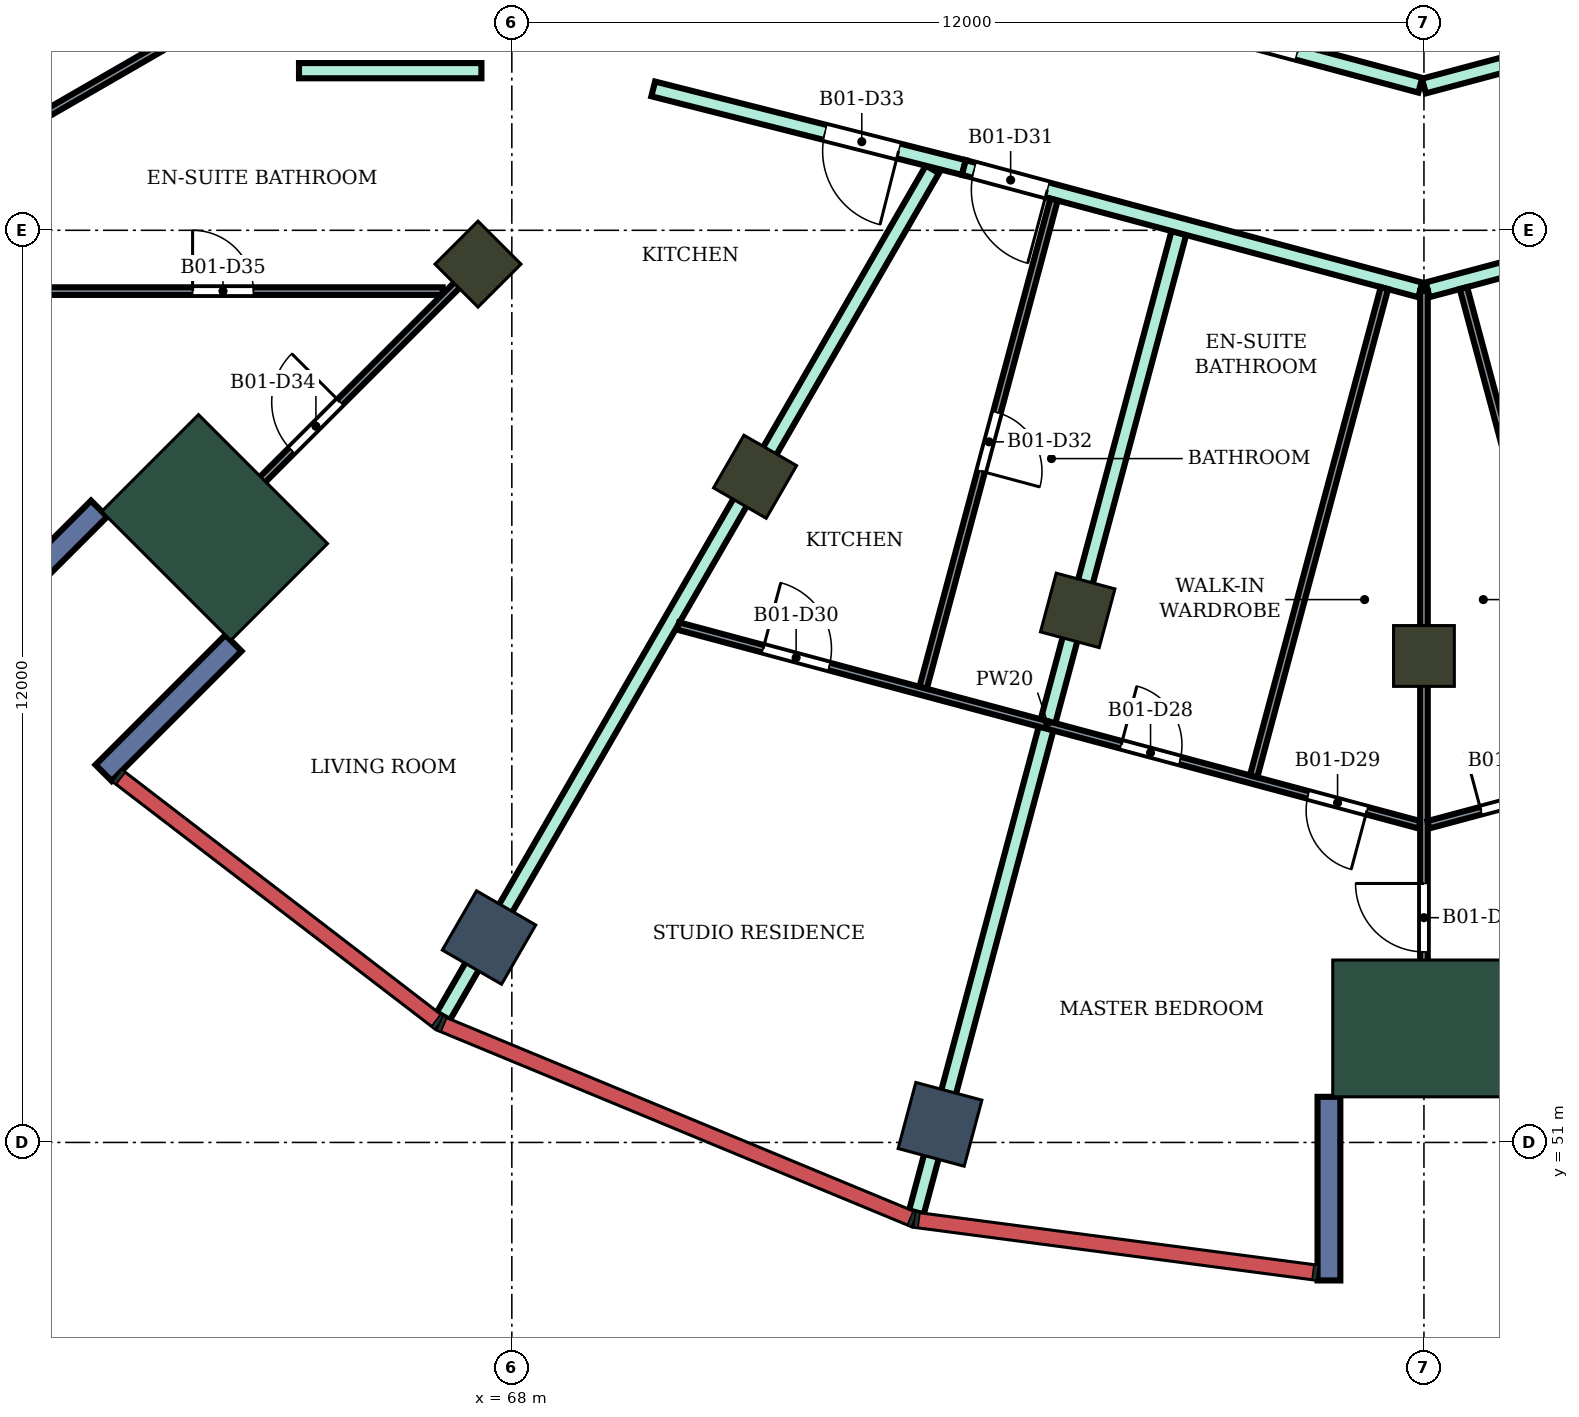
"""IFC4 building model, lengths in metres.
Left out: names, types, materials, properties, quantities, classifications, styles, units other than length and angle.
Written with IfcOpenShell. Run it as: python <this file> out.ifc"""

import sys

from ifc_helpers import new_model, si_unit, direction, frame, frame_2d, origin, origin_2d, place, context, subcontext, project, spatial, rectangle, extrude, element, fill, save


model = new_model("IFC4")
c1 = context("Model", 3, precision=1e-05, world=origin(), true_north=direction((0.0, 1.0)))
c2 = subcontext(c1, "Body", "Model", "MODEL_VIEW")
j1 = project(units=[si_unit("LENGTHUNIT", "METRE"), si_unit("PLANEANGLEUNIT", "RADIAN")], contexts=[c1])
p1 = place(None, origin())
s1 = spatial("IfcSite", under=j1, at=p1, CompositionType="ELEMENT")
p2 = place(p1, origin())
s2 = spatial("IfcBuilding", under=s1, at=p2, CompositionType="ELEMENT")
p3 = place(p2, frame((0.0, 0.0, 212.5)))
s3 = spatial("IfcBuildingStorey", under=s2, at=p3, CompositionType="ELEMENT", Elevation=212.5)
for number, where, z_axis, x_axis in (
    (1, (67.7, 53.696, 0.0), (0.0, 0.0, 1.0), (-0.5, -0.866, 0.0)),
    (2, (73.633, 51.238, 0.0), (0.0, 0.0, 1.0), (-0.259, -0.966, 0.0)),
):
    element("IfcColumn", number, at=place(p3, frame(where, z_axis=z_axis, x_axis=x_axis)), inside=s3, PredefinedType="COLUMN", context=c2, shape_type="SweptSolid", body=[
        extrude(rectangle(XDim=0.9, YDim=0.9, at=origin_2d()), origin(), (0.0, 0.0, 1.0), 4.2),
    ])
for number, where, z_axis, x_axis in (
    (3, (67.555, 62.555, 0.0), (0.0, 0.0, 1.0), (-0.707, -0.707, 0.0)),
    (4, (71.2, 59.758, 0.0), (0.0, 0.0, 1.0), (-0.5, -0.866, 0.0)),
    (5, (75.445, 58.0, 0.0), (0.0, 0.0, 1.0), (-0.259, -0.966, 0.0)),
    (6, (80.0, 57.4, 0.0), (0.0, 0.0, 1.0), (0.0, -1.0, 0.0)),
):
    element("IfcColumn", number, at=place(p3, frame(where, z_axis=z_axis, x_axis=x_axis)), inside=s3, PredefinedType="COLUMN", context=c2, shape_type="SweptSolid", body=[
        extrude(rectangle(XDim=0.8, YDim=0.8, at=origin_2d()), origin(), (0.0, 0.0, 1.0), 4.2),
    ])
for number, where, z_axis, x_axis in (
    (7, (64.09, 59.09, 0.0), (0.0, 0.0, 1.0), (-0.707, -0.707, 0.0)),
    (8, (80.0, 52.5, 0.0), (0.0, 0.0, 1.0), (0.0, -1.0, 0.0)),
):
    element("IfcColumn", number, at=place(p3, frame(where, z_axis=z_axis, x_axis=x_axis)), inside=s3, PredefinedType="COLUMN", context=c2, shape_type="SweptSolid", body=[
        extrude(rectangle(XDim=1.8, YDim=2.4, at=origin_2d()), origin(), (0.0, 0.0, 1.0), 4.2),
    ])
for number, where, z_axis, x_axis in (
    (9, (62.57, 59.338, 0.0), (0.0, 0.0, 1.0), (-0.707, -0.707, 0.0)),
    (10, (64.338, 57.57, 0.0), (0.0, 0.0, 1.0), (-0.707, -0.707, 0.0)),
    (11, (78.75, 51.6, 0.0), (0.0, 0.0, 1.0), (0.0, -1.0, 0.0)),
):
    element("IfcWall", number, at=place(p3, frame(where, z_axis=z_axis, x_axis=x_axis)), inside=s3, PredefinedType="NOTDEFINED", context=c2, shape_type="SweptSolid", body=[
        extrude(rectangle(XDim=2.416, YDim=0.3, at=frame_2d((1.208, 0.0))), origin(), (0.0, 0.0, 1.0), 4.2),
    ])
p4 = place(p3, frame((65.2, 65.1, 0.0), z_axis=(0.0, 0.0, 1.0), x_axis=(1.0, 0.0, 0.0)))
e12 = element("IfcWall", 12, at=p4, inside=s3, PredefinedType="PARTITIONING", context=c2, shape_type="SweptSolid", body=[
    extrude(rectangle(XDim=2.4, YDim=0.2, at=frame_2d((1.2, 0.0))), origin(), (0.0, 0.0, 1.0), 3.75),
])
p5 = place(p3, frame((67.099, 52.66, 0.0), z_axis=(0.0, 0.0, 1.0), x_axis=(0.500120472712, 0.865955837658, 0.0)))
e13 = element("IfcWall", 13, at=p5, inside=s3, PredefinedType="PARTITIONING", context=c2, shape_type="SweptSolid", body=[
    extrude(rectangle(XDim=12.866, YDim=0.2, at=frame_2d((6.433, 0.0))), origin(), (0.0, 0.0, 1.0), 3.75),
])
p6 = place(p3, frame((69.86, 64.86, 0.0), z_axis=(0.0, 0.0, 1.0), x_axis=(0.96942980222, -0.245368821506, 0.0)))
e14 = element("IfcWall", 14, at=p6, inside=s3, PredefinedType="PARTITIONING", context=c2, shape_type="SweptSolid", body=[
    extrude(rectangle(XDim=4.216, YDim=0.2, at=frame_2d((2.108, 0.0))), origin(), (0.0, 0.0, 1.0), 3.75),
])
p7 = place(p6, frame((2.331, 0.0, 0.0)))
e15 = element("IfcOpeningElement", 15, at=p7, cuts=e14, PredefinedType="OPENING", context=c2, shape_type="SweptSolid", body=[
    extrude(rectangle(XDim=1.0, YDim=2.1, at=frame_2d((0.5, 1.05))), frame((0.0, 0.11, 0.0), z_axis=(0.0, -1.0, 0.0), x_axis=(1.0, 0.0, 0.0)), (0.0, 0.0, 1.0), 0.22),
])
p8 = place(p3, frame((73.323, 50.081, 0.0), z_axis=(0.0, 0.0, 1.0), x_axis=(0.258837030899, 0.96592100683, 0.0)))
e16 = element("IfcWall", 16, at=p8, inside=s3, PredefinedType="PARTITIONING", context=c2, shape_type="SweptSolid", body=[
    extrude(rectangle(XDim=13.338, YDim=0.2, at=frame_2d((6.669, 0.0))), origin(), (0.0, 0.0, 1.0), 3.75),
])
p9 = place(p3, frame((73.947, 63.826, 0.0), z_axis=(0.0, 0.0, 1.0), x_axis=(0.965876152316, -0.259004359784, 0.0)))
e17 = element("IfcWall", 17, at=p9, inside=s3, PredefinedType="PARTITIONING", context=c2, shape_type="SweptSolid", body=[
    extrude(rectangle(XDim=6.217, YDim=0.2, at=frame_2d((3.108, 0.0))), origin(), (0.0, 0.0, 1.0), 3.75),
])
p10 = place(p9, frame((0.137, 0.0, 0.0)))
e18 = element("IfcOpeningElement", 18, at=p10, cuts=e17, PredefinedType="OPENING", context=c2, shape_type="SweptSolid", body=[
    extrude(rectangle(XDim=1.0, YDim=2.1, at=frame_2d((0.5, 1.05))), frame((0.0, 0.11, 0.0), z_axis=(0.0, -1.0, 0.0), x_axis=(1.0, 0.0, 0.0)), (0.0, 0.0, 1.0), 0.22),
])
p11 = place(p3, frame((74.603, 66.342, 0.0), z_axis=(0.0, 0.0, 1.0), x_axis=(0.965895298152, -0.258932950796, 0.0)))
e19 = element("IfcWall", 19, at=p11, inside=s3, PredefinedType="PARTITIONING", context=c2, shape_type="SweptSolid", body=[
    extrude(rectangle(XDim=5.538, YDim=0.2, at=frame_2d((2.769, 0.0))), origin(), (0.0, 0.0, 1.0), 3.75),
])
p12 = place(p11, frame((2.062, 0.0, 0.0)))
e20 = element("IfcOpeningElement", 20, at=p12, cuts=e19, PredefinedType="OPENING", context=c2, shape_type="SweptSolid", body=[
    extrude(rectangle(XDim=1.8, YDim=2.1, at=frame_2d((0.9, 1.05))), frame((0.0, 0.11, 0.0), z_axis=(0.0, -1.0, 0.0), x_axis=(1.0, 0.0, 0.0)), (0.0, 0.0, 1.0), 0.22),
])
p13 = place(p3, frame((80.0, 64.898, 0.0), z_axis=(0.0, 0.0, 1.0), x_axis=(0.966237419782, 0.257653349704, 0.0)))
e21 = element("IfcWall", 21, at=p13, inside=s3, PredefinedType="PARTITIONING", context=c2, shape_type="SweptSolid", body=[
    extrude(rectangle(XDim=8.169, YDim=0.2, at=frame_2d((4.084, 0.0))), origin(), (0.0, 0.0, 1.0), 3.75),
])
p14 = place(p13, frame((6.428, 0.0, 0.0)))
e22 = element("IfcOpeningElement", 22, at=p14, cuts=e21, PredefinedType="OPENING", context=c2, shape_type="SweptSolid", body=[
    extrude(rectangle(XDim=0.9, YDim=2.1, at=frame_2d((0.45, 1.05))), frame((0.0, 0.11, 0.0), z_axis=(0.0, -1.0, 0.0), x_axis=(1.0, 0.0, 0.0)), (0.0, 0.0, 1.0), 0.22),
])
p15 = place(p3, frame((80.048, 62.217, 0.0), z_axis=(0.0, 0.0, 1.0), x_axis=(0.966097920642, 0.258175923996, 0.0)))
e23 = element("IfcWall", 23, at=p15, inside=s3, PredefinedType="PARTITIONING", context=c2, shape_type="SweptSolid", body=[
    extrude(rectangle(XDim=6.217, YDim=0.2, at=frame_2d((3.108, 0.0))), origin(), (0.0, 0.0, 1.0), 3.75),
])
p16 = place(p15, frame((3.792, 0.0, 0.0)))
e24 = element("IfcOpeningElement", 24, at=p16, cuts=e23, PredefinedType="OPENING", context=c2, shape_type="SweptSolid", body=[
    extrude(rectangle(XDim=1.0, YDim=2.1, at=frame_2d((0.5, 1.05))), frame((0.0, 0.11, 0.0), z_axis=(0.0, -1.0, 0.0), x_axis=(1.0, 0.0, 0.0)), (0.0, 0.0, 1.0), 0.22),
])
p17 = place(p3, frame((57.658, 62.102, 0.0), z_axis=(0.0, 0.0, 1.0), x_axis=(0.866131372301, 0.499816412211, 0.0)))
e25 = element("IfcWall", 25, at=p17, inside=s3, PredefinedType="PARTITIONING", context=c2, shape_type="SweptSolid", body=[
    extrude(rectangle(XDim=6.598, YDim=0.1, at=frame_2d((3.299, 0.0))), origin(), (0.0, 0.0, 1.0), 3.75),
])
p18 = place(p17, frame((1.77, 0.0, 0.0)))
e26 = element("IfcOpeningElement", 26, at=p18, cuts=e25, PredefinedType="OPENING", context=c2, shape_type="SweptSolid", body=[
    extrude(rectangle(XDim=0.9, YDim=2.1, at=frame_2d((0.45, 1.05))), frame((0.0, 0.06, 0.0), z_axis=(0.0, -1.0, 0.0), x_axis=(1.0, 0.0, 0.0)), (0.0, 0.0, 1.0), 0.12),
])
p19 = place(p3, frame((61.2, 62.2, 0.0), z_axis=(0.0, 0.0, 1.0), x_axis=(1.0, 0.0, 0.0)))
e27 = element("IfcWall", 27, at=p19, inside=s3, PredefinedType="PARTITIONING", context=c2, shape_type="SweptSolid", body=[
    extrude(rectangle(XDim=5.89, YDim=0.1, at=frame_2d((2.945, 0.0))), origin(), (0.0, 0.0, 1.0), 3.75),
])
p20 = place(p19, frame((2.6, 0.0, 0.0)))
e28 = element("IfcOpeningElement", 28, at=p20, cuts=e27, PredefinedType="OPENING", context=c2, shape_type="SweptSolid", body=[
    extrude(rectangle(XDim=0.8, YDim=2.1, at=frame_2d((0.4, 1.05))), frame((0.0, 0.06, 0.0), z_axis=(0.0, -1.0, 0.0), x_axis=(1.0, 0.0, 0.0)), (0.0, 0.0, 1.0), 0.12),
])
p21 = place(p3, frame((63.596, 58.596, 0.0), z_axis=(0.0, 0.0, 1.0), x_axis=(0.707106781187, 0.707106781187, 0.0)))
e29 = element("IfcWall", 29, at=p21, inside=s3, PredefinedType="PARTITIONING", context=c2, shape_type="SweptSolid", body=[
    extrude(rectangle(XDim=5.663, YDim=0.1, at=frame_2d((2.832, 0.0))), origin(), (0.0, 0.0, 1.0), 3.75),
])
p22 = place(p21, frame((2.134, 0.0, 0.0)))
e30 = element("IfcOpeningElement", 30, at=p22, cuts=e29, PredefinedType="OPENING", context=c2, shape_type="SweptSolid", body=[
    extrude(rectangle(XDim=0.9, YDim=2.1, at=frame_2d((0.45, 1.05))), frame((0.0, 0.06, 0.0), z_axis=(0.0, -1.0, 0.0), x_axis=(1.0, 0.0, 0.0)), (0.0, 0.0, 1.0), 0.12),
])
p23 = place(p3, frame((70.188, 57.794, 0.0), z_axis=(0.0, 0.0, 1.0), x_axis=(0.965894620005, -0.25893548047, 0.0)))
e31 = element("IfcWall", 31, at=p23, inside=s3, PredefinedType="PARTITIONING", context=c2, shape_type="SweptSolid", body=[
    extrude(rectangle(XDim=10.098, YDim=0.1, at=frame_2d((5.049, 0.0))), origin(), (0.0, 0.0, 1.0), 3.75),
])
p24 = place(p23, frame((6.034, 0.0, 0.0)))
e32 = element("IfcOpeningElement", 32, at=p24, cuts=e31, PredefinedType="OPENING", context=c2, shape_type="SweptSolid", body=[
    extrude(rectangle(XDim=0.8, YDim=2.1, at=frame_2d((0.4, 1.05))), frame((0.0, 0.06, 0.0), z_axis=(0.0, -1.0, 0.0), x_axis=(1.0, 0.0, 0.0)), (0.0, 0.0, 1.0), 0.12),
])
p25 = place(p23, frame((8.581, 0.0, 0.0)))
e33 = element("IfcOpeningElement", 33, at=p25, cuts=e31, PredefinedType="OPENING", context=c2, shape_type="SweptSolid", body=[
    extrude(rectangle(XDim=0.8, YDim=2.1, at=frame_2d((0.4, 1.05))), frame((0.0, 0.06, 0.0), z_axis=(0.0, -1.0, 0.0), x_axis=(1.0, 0.0, 0.0)), (0.0, 0.0, 1.0), 0.12),
])
p26 = place(p23, frame((1.156, 0.0, 0.0)))
e34 = element("IfcOpeningElement", 34, at=p26, cuts=e31, PredefinedType="OPENING", context=c2, shape_type="SweptSolid", body=[
    extrude(rectangle(XDim=0.9, YDim=2.1, at=frame_2d((0.45, 1.05))), frame((0.0, 0.06, 0.0), z_axis=(0.0, -1.0, 0.0), x_axis=(1.0, 0.0, 0.0)), (0.0, 0.0, 1.0), 0.12),
])
p27 = place(p3, frame((73.411, 56.982, 0.0), z_axis=(0.0, 0.0, 1.0), x_axis=(0.258992397652, 0.96587935994, 0.0)))
e35 = element("IfcWall", 35, at=p27, inside=s3, PredefinedType="PARTITIONING", context=c2, shape_type="SweptSolid", body=[
    extrude(rectangle(XDim=6.649, YDim=0.1, at=frame_2d((3.325, 0.0))), origin(), (0.0, 0.0, 1.0), 3.75),
])
p28 = place(p27, frame((2.95, 0.0, 0.0)))
e36 = element("IfcOpeningElement", 36, at=p28, cuts=e35, PredefinedType="OPENING", context=c2, shape_type="SweptSolid", body=[
    extrude(rectangle(XDim=0.8, YDim=2.1, at=frame_2d((0.4, 1.05))), frame((0.0, 0.06, 0.0), z_axis=(0.0, -1.0, 0.0), x_axis=(1.0, 0.0, 0.0)), (0.0, 0.0, 1.0), 0.12),
])
p29 = place(p3, frame((77.759, 55.816, 0.0), z_axis=(0.0, 0.0, 1.0), x_axis=(0.258802763352, 0.965930188824, 0.0)))
e37 = element("IfcWall", 37, at=p29, inside=s3, PredefinedType="PARTITIONING", context=c2, shape_type="SweptSolid", body=[
    extrude(rectangle(XDim=6.65, YDim=0.1, at=frame_2d((3.325, 0.0))), origin(), (0.0, 0.0, 1.0), 3.75),
])
p30 = place(p3, frame((80.0, 51.8, 0.0), z_axis=(0.0, 0.0, 1.0), x_axis=(0.0, 1.0, 0.0)))
e38 = element("IfcWall", 38, at=p30, inside=s3, PredefinedType="PARTITIONING", context=c2, shape_type="SweptSolid", body=[
    extrude(rectangle(XDim=10.404, YDim=0.1, at=frame_2d((5.202, 0.0))), origin(), (0.0, 0.0, 1.0), 3.75),
])
p31 = place(p30, frame((1.707, 0.0, 0.0)))
e39 = element("IfcOpeningElement", 39, at=p31, cuts=e38, PredefinedType="OPENING", context=c2, shape_type="SweptSolid", body=[
    extrude(rectangle(XDim=0.9, YDim=2.1, at=frame_2d((0.45, 1.05))), frame((0.0, 0.06, 0.0), z_axis=(0.0, -1.0, 0.0), x_axis=(1.0, 0.0, 0.0)), (0.0, 0.0, 1.0), 0.12),
])
p32 = place(p3, frame((80.058, 55.179, 0.0), z_axis=(0.0, 0.0, 1.0), x_axis=(0.965917403523, 0.258850477246, 0.0)))
e40 = element("IfcWall", 40, at=p32, inside=s3, PredefinedType="PARTITIONING", context=c2, shape_type="SweptSolid", body=[
    extrude(rectangle(XDim=5.014, YDim=0.1, at=frame_2d((2.507, 0.0))), origin(), (0.0, 0.0, 1.0), 3.75),
])
p33 = place(p32, frame((0.717, 0.0, 0.0)))
e41 = element("IfcOpeningElement", 41, at=p33, cuts=e40, PredefinedType="OPENING", context=c2, shape_type="SweptSolid", body=[
    extrude(rectangle(XDim=0.8, YDim=2.1, at=frame_2d((0.4, 1.05))), frame((0.0, 0.06, 0.0), z_axis=(0.0, -1.0, 0.0), x_axis=(1.0, 0.0, 0.0)), (0.0, 0.0, 1.0), 0.12),
])
p34 = place(p3, frame((80.52, 62.24, 0.0), z_axis=(0.0, 0.0, 1.0), x_axis=(0.258802763352, -0.965930188824, 0.0)))
e42 = element("IfcWall", 42, at=p34, inside=s3, PredefinedType="PARTITIONING", context=c2, shape_type="SweptSolid", body=[
    extrude(rectangle(XDim=6.65, YDim=0.1, at=frame_2d((3.325, 0.0))), origin(), (0.0, 0.0, 1.0), 3.75),
])
p35 = place(p33, origin())
e43 = element("IfcDoor", 43, at=p35, inside=s3, OperationType="SINGLE_SWING_LEFT", PredefinedType="DOOR", context=c2, shape_type="SweptSolid", body=[
    extrude(rectangle(XDim=0.8, YDim=2.1, at=frame_2d((0.4, 1.05))), frame((0.0, 0.025, 0.0), z_axis=(0.0, -1.0, 0.0), x_axis=(1.0, 0.0, 0.0)), (0.0, 0.0, 1.0), 0.05),
])
fill(e41, e43)
p36 = place(p31, origin())
e44 = element("IfcDoor", 44, at=p36, inside=s3, OperationType="SINGLE_SWING_RIGHT", PredefinedType="DOOR", context=c2, shape_type="SweptSolid", body=[
    extrude(rectangle(XDim=0.9, YDim=2.1, at=frame_2d((0.45, 1.05))), frame((0.0, 0.025, 0.0), z_axis=(0.0, -1.0, 0.0), x_axis=(1.0, 0.0, 0.0)), (0.0, 0.0, 1.0), 0.05),
])
fill(e39, e44)
p37 = place(p24, origin())
e45 = element("IfcDoor", 45, at=p37, inside=s3, OperationType="SINGLE_SWING_LEFT", PredefinedType="DOOR", context=c2, shape_type="SweptSolid", body=[
    extrude(rectangle(XDim=0.8, YDim=2.1, at=frame_2d((0.4, 1.05))), frame((0.0, 0.025, 0.0), z_axis=(0.0, -1.0, 0.0), x_axis=(1.0, 0.0, 0.0)), (0.0, 0.0, 1.0), 0.05),
])
fill(e32, e45)
p38 = place(p25, frame((0.8, 0.0, 0.0), z_axis=(0.0, 0.0, 1.0), x_axis=(-1.0, 0.0, 0.0)))
e46 = element("IfcDoor", 46, at=p38, inside=s3, OperationType="SINGLE_SWING_LEFT", PredefinedType="DOOR", context=c2, shape_type="SweptSolid", body=[
    extrude(rectangle(XDim=0.8, YDim=2.1, at=frame_2d((0.4, 1.05))), frame((0.0, 0.025, 0.0), z_axis=(0.0, -1.0, 0.0), x_axis=(1.0, 0.0, 0.0)), (0.0, 0.0, 1.0), 0.05),
])
fill(e33, e46)
p39 = place(p26, origin())
e47 = element("IfcDoor", 47, at=p39, inside=s3, OperationType="SINGLE_SWING_LEFT", PredefinedType="DOOR", context=c2, shape_type="SweptSolid", body=[
    extrude(rectangle(XDim=0.9, YDim=2.1, at=frame_2d((0.45, 1.05))), frame((0.0, 0.025, 0.0), z_axis=(0.0, -1.0, 0.0), x_axis=(1.0, 0.0, 0.0)), (0.0, 0.0, 1.0), 0.05),
])
fill(e34, e47)
p40 = place(p10, frame((1.0, 0.0, 0.0), z_axis=(0.0, 0.0, 1.0), x_axis=(-1.0, 0.0, 0.0)))
e48 = element("IfcDoor", 48, at=p40, inside=s3, OperationType="SINGLE_SWING_LEFT", PredefinedType="DOOR", context=c2, shape_type="SweptSolid", body=[
    extrude(rectangle(XDim=1.0, YDim=2.1, at=frame_2d((0.5, 1.05))), frame((0.0, 0.025, 0.0), z_axis=(0.0, -1.0, 0.0), x_axis=(1.0, 0.0, 0.0)), (0.0, 0.0, 1.0), 0.05),
])
fill(e18, e48)
p41 = place(p28, frame((0.8, 0.0, 0.0), z_axis=(0.0, 0.0, 1.0), x_axis=(-1.0, 0.0, 0.0)))
e49 = element("IfcDoor", 49, at=p41, inside=s3, OperationType="SINGLE_SWING_RIGHT", PredefinedType="DOOR", context=c2, shape_type="SweptSolid", body=[
    extrude(rectangle(XDim=0.8, YDim=2.1, at=frame_2d((0.4, 1.05))), frame((0.0, 0.025, 0.0), z_axis=(0.0, -1.0, 0.0), x_axis=(1.0, 0.0, 0.0)), (0.0, 0.0, 1.0), 0.05),
])
fill(e36, e49)
p42 = place(p7, frame((1.0, 0.0, 0.0), z_axis=(0.0, 0.0, 1.0), x_axis=(-1.0, 0.0, 0.0)))
e50 = element("IfcDoor", 50, at=p42, inside=s3, OperationType="SINGLE_SWING_LEFT", PredefinedType="DOOR", context=c2, shape_type="SweptSolid", body=[
    extrude(rectangle(XDim=1.0, YDim=2.1, at=frame_2d((0.5, 1.05))), frame((0.0, 0.025, 0.0), z_axis=(0.0, -1.0, 0.0), x_axis=(1.0, 0.0, 0.0)), (0.0, 0.0, 1.0), 0.05),
])
fill(e15, e50)
p43 = place(p22, origin())
e51 = element("IfcDoor", 51, at=p43, inside=s3, OperationType="SINGLE_SWING_RIGHT", PredefinedType="DOOR", context=c2, shape_type="SweptSolid", body=[
    extrude(rectangle(XDim=0.9, YDim=2.1, at=frame_2d((0.45, 1.05))), frame((0.0, 0.025, 0.0), z_axis=(0.0, -1.0, 0.0), x_axis=(1.0, 0.0, 0.0)), (0.0, 0.0, 1.0), 0.05),
])
fill(e30, e51)
p44 = place(p20, origin())
e52 = element("IfcDoor", 52, at=p44, inside=s3, OperationType="SINGLE_SWING_LEFT", PredefinedType="DOOR", context=c2, shape_type="SweptSolid", body=[
    extrude(rectangle(XDim=0.8, YDim=2.1, at=frame_2d((0.4, 1.05))), frame((0.0, 0.025, 0.0), z_axis=(0.0, -1.0, 0.0), x_axis=(1.0, 0.0, 0.0)), (0.0, 0.0, 1.0), 0.05),
])
fill(e28, e52)
p45 = place(p12, origin())
e53 = element("IfcDoor", 53, at=p45, inside=s3, OperationType="DOUBLE_DOOR_SINGLE_SWING", PredefinedType="DOOR", context=c2, shape_type="SweptSolid", body=[
    extrude(rectangle(XDim=1.8, YDim=2.1, at=frame_2d((0.9, 1.05))), frame((0.0, 0.025, 0.0), z_axis=(0.0, -1.0, 0.0), x_axis=(1.0, 0.0, 0.0)), (0.0, 0.0, 1.0), 0.05),
])
fill(e20, e53)
save(model, sys.argv[1])
